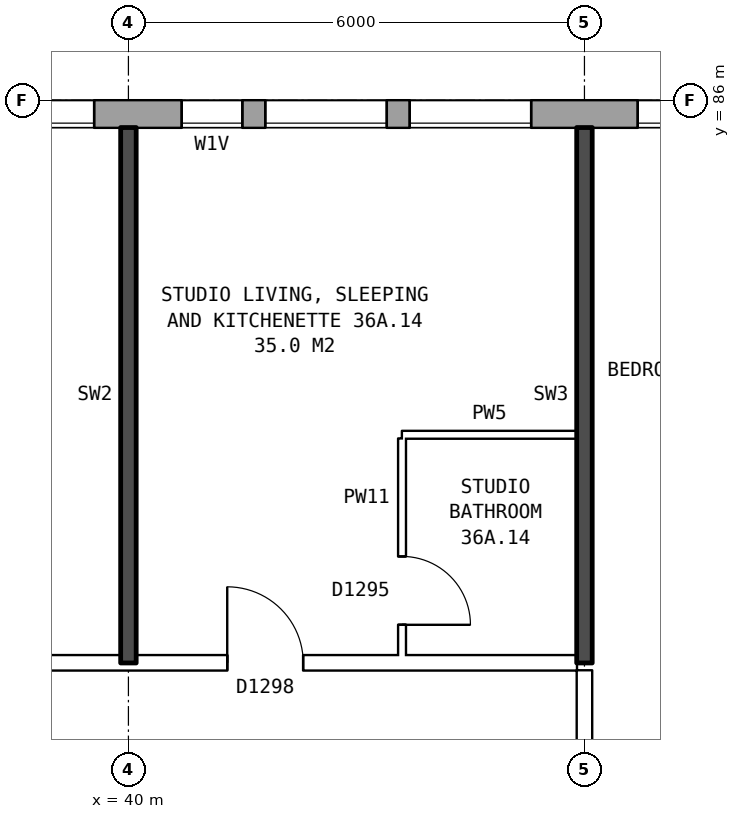
"""IFC4 building model, lengths in metres.
Left out: names, types, materials, properties, quantities, classifications, styles, units other than length and angle.
Written with IfcOpenShell. Run it as: python <this file> out.ifc"""

import sys

from ifc_helpers import new_model, si_unit, direction, frame, frame_2d, origin, place, context, subcontext, project, spatial, rectangle, extrude, element, fill, save


model = new_model("IFC4")
c1 = context("Model", 3, precision=1e-05, world=origin(), true_north=direction((0.0, 1.0)))
c2 = subcontext(c1, "Body", "Model", "MODEL_VIEW")
j1 = project(units=[si_unit("LENGTHUNIT", "METRE"), si_unit("PLANEANGLEUNIT", "RADIAN")], contexts=[c1])
p1 = place(None, origin())
s1 = spatial("IfcSite", under=j1, at=p1, CompositionType="ELEMENT")
p2 = place(p1, origin())
s2 = spatial("IfcBuilding", under=s1, at=p2, CompositionType="ELEMENT")
p3 = place(p2, frame((0.0, 0.0, 129.9)))
s3 = spatial("IfcBuildingStorey", under=s2, at=p3, CompositionType="ELEMENT", Elevation=129.9)
p4 = place(p3, frame((72.925, 85.82, 0.0), z_axis=(0.0, 0.0, 1.0), x_axis=(-1.0, 0.0, 0.0)))
e1 = element("IfcWall", 1, at=p4, inside=s3, PredefinedType="STANDARD", context=c2, shape_type="SweptSolid", body=[
    extrude(rectangle(XDim=43.101, YDim=0.36, at=frame_2d((21.55, 0.0))), origin(), (0.0, 0.0, 1.0), 2.85),
])
p5 = place(p4, frame((0.625, 0.0, 0.8)))
e2 = element("IfcOpeningElement", 2, at=p5, cuts=e1, PredefinedType="OPENING", context=c2, shape_type="SweptSolid", body=[
    extrude(rectangle(XDim=1.6, YDim=1.8, at=frame_2d((0.8, 0.9))), frame((0.0, 0.19, 0.0), z_axis=(0.0, -1.0, 0.0), x_axis=(1.0, 0.0, 0.0)), (0.0, 0.0, 1.0), 0.38),
])
p6 = place(p4, frame((3.625, 0.0, 0.8)))
e3 = element("IfcOpeningElement", 3, at=p6, cuts=e1, PredefinedType="OPENING", context=c2, shape_type="SweptSolid", body=[
    extrude(rectangle(XDim=1.6, YDim=1.8, at=frame_2d((0.8, 0.9))), frame((0.0, 0.19, 0.0), z_axis=(0.0, -1.0, 0.0), x_axis=(1.0, 0.0, 0.0)), (0.0, 0.0, 1.0), 0.38),
])
p7 = place(p4, frame((6.625, 0.0, 0.8)))
e4 = element("IfcOpeningElement", 4, at=p7, cuts=e1, PredefinedType="OPENING", context=c2, shape_type="SweptSolid", body=[
    extrude(rectangle(XDim=1.6, YDim=1.8, at=frame_2d((0.8, 0.9))), frame((0.0, 0.19, 0.0), z_axis=(0.0, -1.0, 0.0), x_axis=(1.0, 0.0, 0.0)), (0.0, 0.0, 1.0), 0.38),
])
p8 = place(p4, frame((10.175, 0.0, 0.15)))
e5 = element("IfcOpeningElement", 5, at=p8, cuts=e1, PredefinedType="OPENING", context=c2, shape_type="SweptSolid", body=[
    extrude(rectangle(XDim=0.6, YDim=0.9, at=frame_2d((0.3, 0.45))), frame((0.0, 0.19, 0.0), z_axis=(0.0, -1.0, 0.0), x_axis=(1.0, 0.0, 0.0)), (0.0, 0.0, 1.0), 0.38),
])
p9 = place(p4, frame((12.625, 0.0, 0.8)))
e6 = element("IfcOpeningElement", 6, at=p9, cuts=e1, PredefinedType="OPENING", context=c2, shape_type="SweptSolid", body=[
    extrude(rectangle(XDim=1.6, YDim=1.8, at=frame_2d((0.8, 0.9))), frame((0.0, 0.19, 0.0), z_axis=(0.0, -1.0, 0.0), x_axis=(1.0, 0.0, 0.0)), (0.0, 0.0, 1.0), 0.38),
])
p10 = place(p4, frame((15.625, 0.0, 0.8)))
e7 = element("IfcOpeningElement", 7, at=p10, cuts=e1, PredefinedType="OPENING", context=c2, shape_type="SweptSolid", body=[
    extrude(rectangle(XDim=1.6, YDim=1.8, at=frame_2d((0.8, 0.9))), frame((0.0, 0.19, 0.0), z_axis=(0.0, -1.0, 0.0), x_axis=(1.0, 0.0, 0.0)), (0.0, 0.0, 1.0), 0.38),
])
p11 = place(p4, frame((18.625, 0.0, 0.8)))
e8 = element("IfcOpeningElement", 8, at=p11, cuts=e1, PredefinedType="OPENING", context=c2, shape_type="SweptSolid", body=[
    extrude(rectangle(XDim=1.6, YDim=1.8, at=frame_2d((0.8, 0.9))), frame((0.0, 0.19, 0.0), z_axis=(0.0, -1.0, 0.0), x_axis=(1.0, 0.0, 0.0)), (0.0, 0.0, 1.0), 0.38),
])
p12 = place(p4, frame((21.625, 0.0, 0.8)))
e9 = element("IfcOpeningElement", 9, at=p12, cuts=e1, PredefinedType="OPENING", context=c2, shape_type="SweptSolid", body=[
    extrude(rectangle(XDim=1.6, YDim=1.8, at=frame_2d((0.8, 0.9))), frame((0.0, 0.19, 0.0), z_axis=(0.0, -1.0, 0.0), x_axis=(1.0, 0.0, 0.0)), (0.0, 0.0, 1.0), 0.38),
])
p13 = place(p4, frame((24.625, 0.0, 0.8)))
e10 = element("IfcOpeningElement", 10, at=p13, cuts=e1, PredefinedType="OPENING", context=c2, shape_type="SweptSolid", body=[
    extrude(rectangle(XDim=1.6, YDim=1.8, at=frame_2d((0.8, 0.9))), frame((0.0, 0.19, 0.0), z_axis=(0.0, -1.0, 0.0), x_axis=(1.0, 0.0, 0.0)), (0.0, 0.0, 1.0), 0.38),
])
p14 = place(p4, frame((27.625, 0.0, 0.8)))
e11 = element("IfcOpeningElement", 11, at=p14, cuts=e1, PredefinedType="OPENING", context=c2, shape_type="SweptSolid", body=[
    extrude(rectangle(XDim=1.6, YDim=1.8, at=frame_2d((0.8, 0.9))), frame((0.0, 0.19, 0.0), z_axis=(0.0, -1.0, 0.0), x_axis=(1.0, 0.0, 0.0)), (0.0, 0.0, 1.0), 0.38),
])
p15 = place(p4, frame((29.525, 0.0, 0.8)))
e12 = element("IfcOpeningElement", 12, at=p15, cuts=e1, PredefinedType="OPENING", context=c2, shape_type="SweptSolid", body=[
    extrude(rectangle(XDim=1.6, YDim=1.8, at=frame_2d((0.8, 0.9))), frame((0.0, 0.19, 0.0), z_axis=(0.0, -1.0, 0.0), x_axis=(1.0, 0.0, 0.0)), (0.0, 0.0, 1.0), 0.38),
])
p16 = place(p4, frame((33.375, 0.0, 1.7)))
e13 = element("IfcOpeningElement", 13, at=p16, cuts=e1, PredefinedType="OPENING", context=c2, shape_type="SweptSolid", body=[
    extrude(rectangle(XDim=0.8, YDim=0.9, at=frame_2d((0.4, 0.45))), frame((0.0, 0.19, 0.0), z_axis=(0.0, -1.0, 0.0), x_axis=(1.0, 0.0, 0.0)), (0.0, 0.0, 1.0), 0.38),
])
p17 = place(p4, frame((36.625, 0.0, 0.8)))
e14 = element("IfcOpeningElement", 14, at=p17, cuts=e1, PredefinedType="OPENING", context=c2, shape_type="SweptSolid", body=[
    extrude(rectangle(XDim=1.6, YDim=1.8, at=frame_2d((0.8, 0.9))), frame((0.0, 0.19, 0.0), z_axis=(0.0, -1.0, 0.0), x_axis=(1.0, 0.0, 0.0)), (0.0, 0.0, 1.0), 0.38),
])
p18 = place(p4, frame((39.625, 0.0, 0.8)))
e15 = element("IfcOpeningElement", 15, at=p18, cuts=e1, PredefinedType="OPENING", context=c2, shape_type="SweptSolid", body=[
    extrude(rectangle(XDim=1.6, YDim=1.8, at=frame_2d((0.8, 0.9))), frame((0.0, 0.19, 0.0), z_axis=(0.0, -1.0, 0.0), x_axis=(1.0, 0.0, 0.0)), (0.0, 0.0, 1.0), 0.38),
])
p19 = place(p4, frame((11.175, 0.0, 0.15)))
e16 = element("IfcOpeningElement", 16, at=p19, cuts=e1, PredefinedType="OPENING", context=c2, shape_type="SweptSolid", body=[
    extrude(rectangle(XDim=0.6, YDim=1.8, at=frame_2d((0.3, 0.9))), frame((0.0, 0.19, 0.0), z_axis=(0.0, -1.0, 0.0), x_axis=(1.0, 0.0, 0.0)), (0.0, 0.0, 1.0), 0.38),
])
p20 = place(p4, frame((31.425, 0.0, 0.8)))
e17 = element("IfcOpeningElement", 17, at=p20, cuts=e1, PredefinedType="OPENING", context=c2, shape_type="SweptSolid", body=[
    extrude(rectangle(XDim=0.8, YDim=0.9, at=frame_2d((0.4, 0.45))), frame((0.0, 0.19, 0.0), z_axis=(0.0, -1.0, 0.0), x_axis=(1.0, 0.0, 0.0)), (0.0, 0.0, 1.0), 0.38),
])
p21 = place(p4, frame((34.475, 0.0, 0.8)))
e18 = element("IfcOpeningElement", 18, at=p21, cuts=e1, PredefinedType="OPENING", context=c2, shape_type="SweptSolid", body=[
    extrude(rectangle(XDim=1.6, YDim=1.8, at=frame_2d((0.8, 0.9))), frame((0.0, 0.19, 0.0), z_axis=(0.0, -1.0, 0.0), x_axis=(1.0, 0.0, 0.0)), (0.0, 0.0, 1.0), 0.38),
])
p22 = place(p3, frame((27.11, 78.6, 0.0), z_axis=(0.0, 0.0, 1.0), x_axis=(1.0, 0.0, 0.0)))
e19 = element("IfcWall", 19, at=p22, inside=s3, PredefinedType="PARTITIONING", context=c2, shape_type="SweptSolid", body=[
    extrude(rectangle(XDim=18.79, YDim=0.2, at=frame_2d((9.395, 0.0))), origin(), (0.0, 0.0, 1.0), 2.85),
])
p23 = place(p22, frame((14.19, 0.0, 0.0)))
e20 = element("IfcOpeningElement", 20, at=p23, cuts=e19, PredefinedType="OPENING", context=c2, shape_type="SweptSolid", body=[
    extrude(rectangle(XDim=1.0, YDim=2.1, at=frame_2d((0.5, 1.05))), frame((0.0, 0.11, 0.0), z_axis=(0.0, -1.0, 0.0), x_axis=(1.0, 0.0, 0.0)), (0.0, 0.0, 1.0), 0.22),
])
p24 = place(p22, frame((10.39, 0.0, 0.0)))
e21 = element("IfcOpeningElement", 21, at=p24, cuts=e19, PredefinedType="OPENING", context=c2, shape_type="SweptSolid", body=[
    extrude(rectangle(XDim=1.0, YDim=2.1, at=frame_2d((0.5, 1.05))), frame((0.0, 0.11, 0.0), z_axis=(0.0, -1.0, 0.0), x_axis=(1.0, 0.0, 0.0)), (0.0, 0.0, 1.0), 0.22),
])
p25 = place(p22, frame((4.59, 0.0, 0.0)))
e22 = element("IfcOpeningElement", 22, at=p25, cuts=e19, PredefinedType="OPENING", context=c2, shape_type="SweptSolid", body=[
    extrude(rectangle(XDim=1.0, YDim=2.1, at=frame_2d((0.5, 1.05))), frame((0.0, 0.11, 0.0), z_axis=(0.0, -1.0, 0.0), x_axis=(1.0, 0.0, 0.0)), (0.0, 0.0, 1.0), 0.22),
])
p26 = place(p3, frame((43.6, 81.6, 0.0), z_axis=(0.0, 0.0, 1.0), x_axis=(1.0, 0.0, 0.0)))
e23 = element("IfcWall", 23, at=p26, inside=s3, PredefinedType="PARTITIONING", context=c2, shape_type="SweptSolid", body=[
    extrude(rectangle(XDim=2.3, YDim=0.1, at=frame_2d((1.15, 0.0))), origin(), (0.0, 0.0, 1.0), 2.85),
])
p27 = place(p3, frame((40.0, 78.6, 0.0), z_axis=(0.0, 0.0, 1.0), x_axis=(0.0, 1.0, 0.0)))
e24 = element("IfcWall", 24, at=p27, inside=s3, PredefinedType="SOLIDWALL", context=c2, shape_type="SweptSolid", body=[
    extrude(rectangle(XDim=7.04, YDim=0.2, at=frame_2d((3.52, 0.0))), origin(), (0.0, 0.0, 1.0), 2.85),
])
p28 = place(p3, frame((43.6, 78.7, 0.0), z_axis=(0.0, 0.0, 1.0), x_axis=(0.0, 1.0, 0.0)))
e25 = element("IfcWall", 25, at=p28, inside=s3, PredefinedType="PARTITIONING", context=c2, shape_type="SweptSolid", body=[
    extrude(rectangle(XDim=2.85, YDim=0.1, at=frame_2d((1.425, 0.0))), origin(), (0.0, 0.0, 1.0), 2.85),
])
p29 = place(p28, frame((0.4, 0.0, 0.0)))
e26 = element("IfcOpeningElement", 26, at=p29, cuts=e25, PredefinedType="OPENING", context=c2, shape_type="SweptSolid", body=[
    extrude(rectangle(XDim=0.9, YDim=2.1, at=frame_2d((0.45, 1.05))), frame((0.0, 0.06, 0.0), z_axis=(0.0, -1.0, 0.0), x_axis=(1.0, 0.0, 0.0)), (0.0, 0.0, 1.0), 0.12),
])
p30 = place(p3, frame((46.0, 76.3, 0.0), z_axis=(0.0, 0.0, 1.0), x_axis=(0.0, 1.0, 0.0)))
e27 = element("IfcWall", 27, at=p30, inside=s3, PredefinedType="PARTITIONING", context=c2, shape_type="SweptSolid", body=[
    extrude(rectangle(XDim=2.2, YDim=0.2, at=frame_2d((1.1, 0.0))), origin(), (0.0, 0.0, 1.0), 2.85),
])
p31 = place(p3, frame((46.0, 78.6, 0.0), z_axis=(0.0, 0.0, 1.0), x_axis=(0.0, 1.0, 0.0)))
e28 = element("IfcWall", 28, at=p31, inside=s3, PredefinedType="SOLIDWALL", context=c2, shape_type="SweptSolid", body=[
    extrude(rectangle(XDim=7.04, YDim=0.2, at=frame_2d((3.52, 0.0))), origin(), (0.0, 0.0, 1.0), 2.85),
])
p32 = place(p13, origin())
e29 = element("IfcWindow", 29, at=p32, inside=s3, PartitioningType="SINGLE_PANEL", PredefinedType="WINDOW", context=c2, shape_type="SweptSolid", body=[
    extrude(rectangle(XDim=1.6, YDim=1.8, at=frame_2d((0.8, 0.9))), frame((0.0, 0.15, 0.0), z_axis=(0.0, -1.0, 0.0), x_axis=(1.0, 0.0, 0.0)), (0.0, 0.0, 1.0), 0.06),
])
fill(e10, e29)
p33 = place(p14, origin())
e30 = element("IfcWindow", 30, at=p33, inside=s3, PartitioningType="SINGLE_PANEL", PredefinedType="WINDOW", context=c2, shape_type="SweptSolid", body=[
    extrude(rectangle(XDim=1.6, YDim=1.8, at=frame_2d((0.8, 0.9))), frame((0.0, 0.15, 0.0), z_axis=(0.0, -1.0, 0.0), x_axis=(1.0, 0.0, 0.0)), (0.0, 0.0, 1.0), 0.06),
])
fill(e11, e30)
p34 = place(p15, origin())
e31 = element("IfcWindow", 31, at=p34, inside=s3, PartitioningType="SINGLE_PANEL", PredefinedType="WINDOW", context=c2, shape_type="SweptSolid", body=[
    extrude(rectangle(XDim=1.6, YDim=1.8, at=frame_2d((0.8, 0.9))), frame((0.0, 0.15, 0.0), z_axis=(0.0, -1.0, 0.0), x_axis=(1.0, 0.0, 0.0)), (0.0, 0.0, 1.0), 0.06),
])
fill(e12, e31)
p35 = place(p16, origin())
e32 = element("IfcWindow", 32, at=p35, inside=s3, PartitioningType="SINGLE_PANEL", PredefinedType="WINDOW", context=c2, shape_type="SweptSolid", body=[
    extrude(rectangle(XDim=0.8, YDim=0.9, at=frame_2d((0.4, 0.45))), frame((0.0, 0.15, 0.0), z_axis=(0.0, -1.0, 0.0), x_axis=(1.0, 0.0, 0.0)), (0.0, 0.0, 1.0), 0.06),
])
fill(e13, e32)
p36 = place(p23, origin())
e33 = element("IfcDoor", 33, at=p36, inside=s3, OperationType="SINGLE_SWING_LEFT", PredefinedType="DOOR", context=c2, shape_type="SweptSolid", body=[
    extrude(rectangle(XDim=1.0, YDim=2.1, at=frame_2d((0.5, 1.05))), frame((0.0, 0.025, 0.0), z_axis=(0.0, -1.0, 0.0), x_axis=(1.0, 0.0, 0.0)), (0.0, 0.0, 1.0), 0.05),
])
fill(e20, e33)
p37 = place(p29, frame((0.9, 0.0, 0.0), z_axis=(0.0, 0.0, 1.0), x_axis=(-1.0, 0.0, 0.0)))
e34 = element("IfcDoor", 34, at=p37, inside=s3, OperationType="SINGLE_SWING_RIGHT", PredefinedType="DOOR", context=c2, shape_type="SweptSolid", body=[
    extrude(rectangle(XDim=0.9, YDim=2.1, at=frame_2d((0.45, 1.05))), frame((0.0, 0.025, 0.0), z_axis=(0.0, -1.0, 0.0), x_axis=(1.0, 0.0, 0.0)), (0.0, 0.0, 1.0), 0.05),
])
fill(e26, e34)
p38 = place(p20, origin())
e35 = element("IfcWindow", 35, at=p38, inside=s3, PartitioningType="SINGLE_PANEL", PredefinedType="WINDOW", context=c2, shape_type="SweptSolid", body=[
    extrude(rectangle(XDim=0.8, YDim=0.9, at=frame_2d((0.4, 0.45))), frame((0.0, 0.15, 0.0), z_axis=(0.0, -1.0, 0.0), x_axis=(1.0, 0.0, 0.0)), (0.0, 0.0, 1.0), 0.06),
])
fill(e17, e35)
save(model, sys.argv[1])
